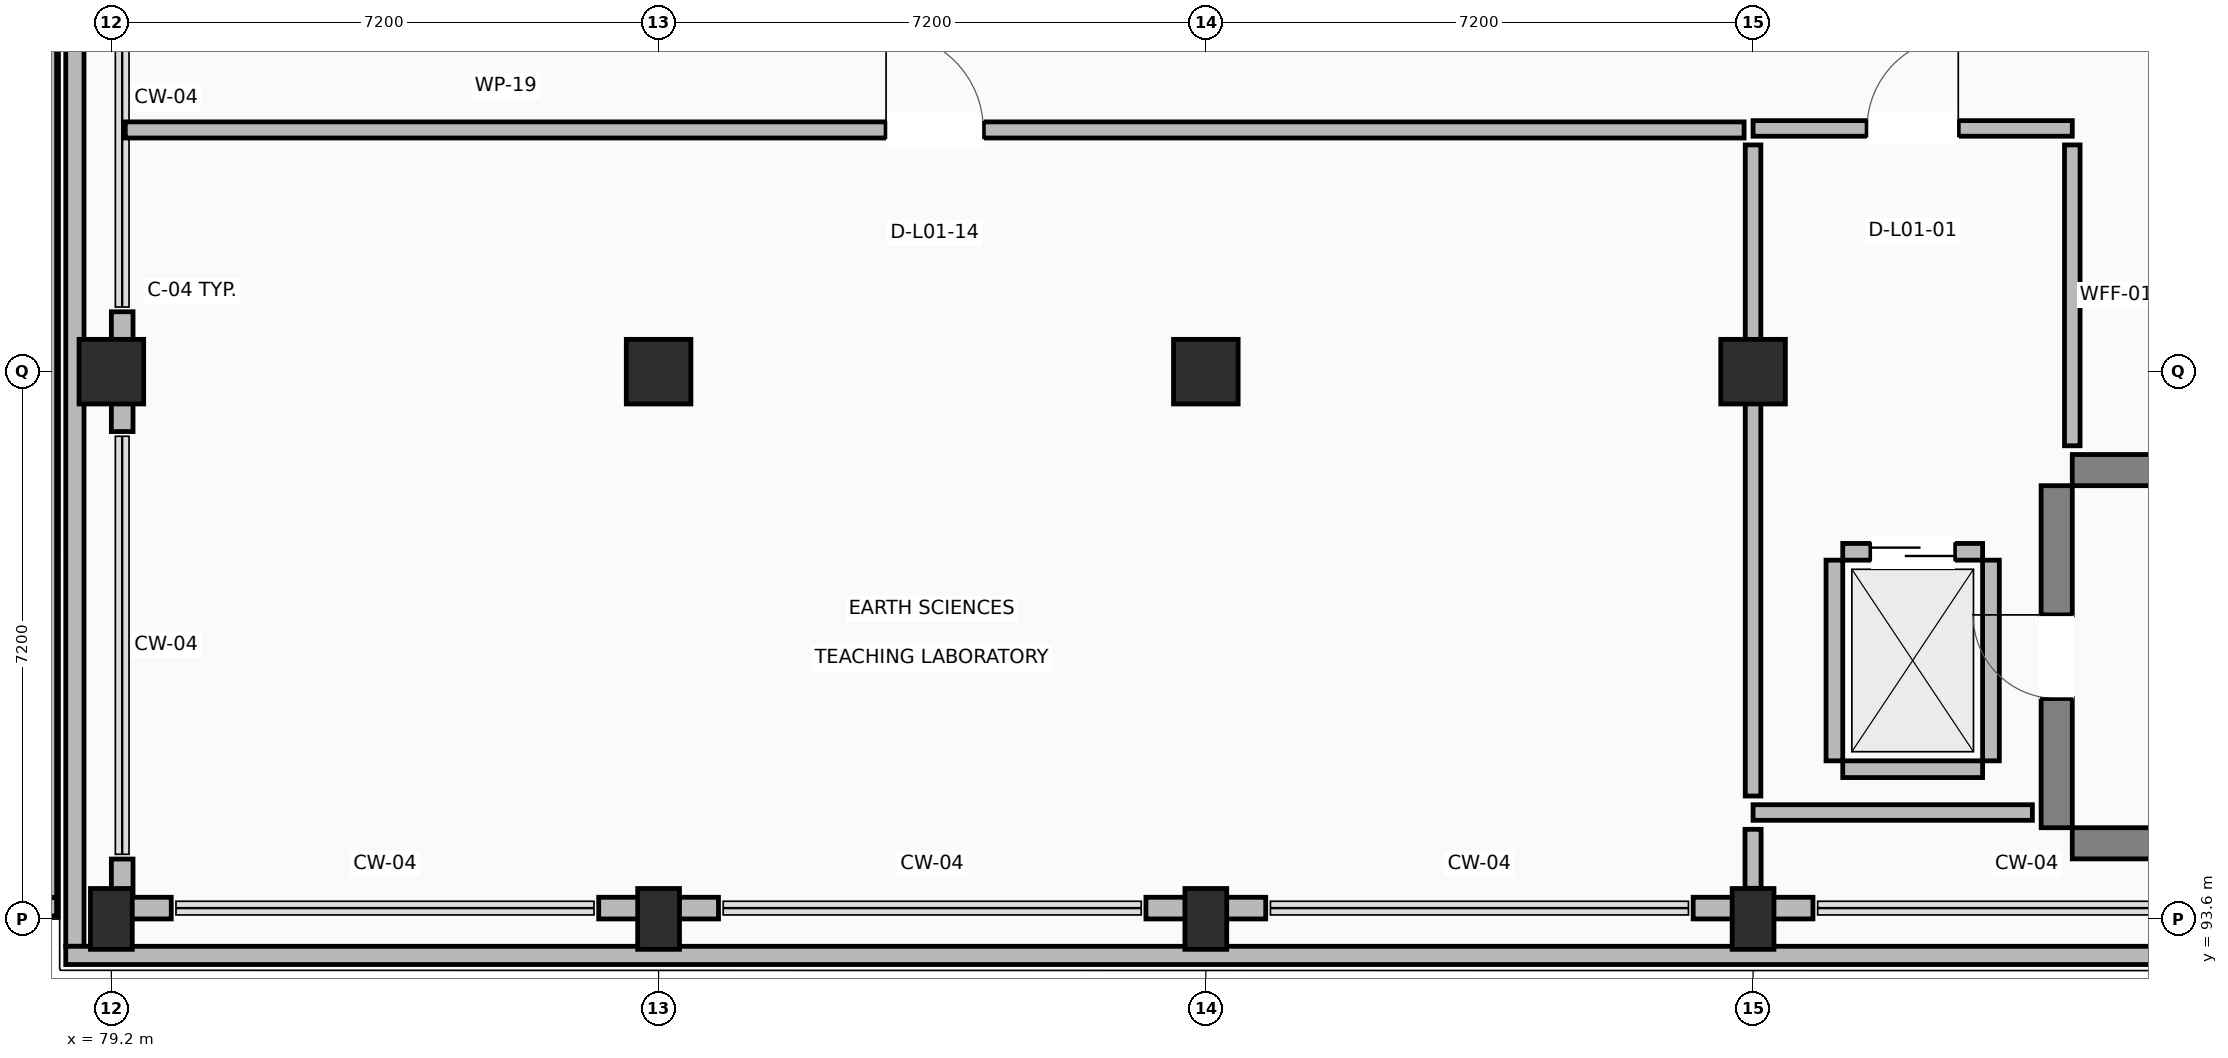
"""IFC4 building model, lengths in metres.
Left out: names, types, materials, properties, quantities, classifications, styles, units other than length and angle.
Written with IfcOpenShell. Run it as: python <this file> out.ifc"""

import sys

from ifc_helpers import new_model, si_unit, direction, frame, frame_2d, origin, origin_2d, place, context, subcontext, project, spatial, rectangle, extrude, element, fill, save


model = new_model("IFC4")
c1 = context("Model", 3, precision=1e-05, world=origin(), true_north=direction((0.0, 1.0)))
c2 = subcontext(c1, "Body", "Model", "MODEL_VIEW")
j1 = project(units=[si_unit("LENGTHUNIT", "METRE"), si_unit("PLANEANGLEUNIT", "RADIAN")], contexts=[c1])
p1 = place(None, origin())
s1 = spatial("IfcSite", under=j1, at=p1, CompositionType="ELEMENT")
p2 = place(p1, origin())
s2 = spatial("IfcBuilding", under=s1, at=p2, CompositionType="ELEMENT")
p3 = place(p2, frame((0.0, 0.0, 4.5)))
s3 = spatial("IfcBuildingStorey", under=s2, at=p3, CompositionType="ELEMENT", Elevation=4.5)
p4 = place(p3, frame((79.2, 93.6, 0.0), z_axis=(0.0, 0.0, 1.0), x_axis=(1.0, 0.0, 0.0)))
e1 = element("IfcColumn", 1, at=p4, inside=s3, PredefinedType="COLUMN", context=c2, shape_type="SweptSolid", body=[
    extrude(rectangle(XDim=0.55, YDim=0.8, at=origin_2d()), origin(), (0.0, 0.0, 1.0), 4.22),
])
p5 = place(p3, frame((79.2, 100.8, 0.0), z_axis=(0.0, 0.0, 1.0), x_axis=(1.0, 0.0, 0.0)))
e2 = element("IfcColumn", 2, at=p5, inside=s3, PredefinedType="COLUMN", context=c2, shape_type="SweptSolid", body=[
    extrude(rectangle(XDim=0.85, YDim=0.85, at=origin_2d()), origin(), (0.0, 0.0, 1.0), 4.22),
])
p6 = place(p3, frame((86.4, 93.6, 0.0), z_axis=(0.0, 0.0, 1.0), x_axis=(1.0, 0.0, 0.0)))
e3 = element("IfcColumn", 3, at=p6, inside=s3, PredefinedType="COLUMN", context=c2, shape_type="SweptSolid", body=[
    extrude(rectangle(XDim=0.55, YDim=0.8, at=origin_2d()), origin(), (0.0, 0.0, 1.0), 4.22),
])
p7 = place(p3, frame((86.4, 100.8, 0.0), z_axis=(0.0, 0.0, 1.0), x_axis=(1.0, 0.0, 0.0)))
e4 = element("IfcColumn", 4, at=p7, inside=s3, PredefinedType="COLUMN", context=c2, shape_type="SweptSolid", body=[
    extrude(rectangle(XDim=0.85, YDim=0.85, at=origin_2d()), origin(), (0.0, 0.0, 1.0), 4.22),
])
p8 = place(p3, frame((93.6, 93.6, 0.0), z_axis=(0.0, 0.0, 1.0), x_axis=(1.0, 0.0, 0.0)))
e5 = element("IfcColumn", 5, at=p8, inside=s3, PredefinedType="COLUMN", context=c2, shape_type="SweptSolid", body=[
    extrude(rectangle(XDim=0.55, YDim=0.8, at=origin_2d()), origin(), (0.0, 0.0, 1.0), 4.22),
])
p9 = place(p3, frame((93.6, 100.8, 0.0), z_axis=(0.0, 0.0, 1.0), x_axis=(1.0, 0.0, 0.0)))
e6 = element("IfcColumn", 6, at=p9, inside=s3, PredefinedType="COLUMN", context=c2, shape_type="SweptSolid", body=[
    extrude(rectangle(XDim=0.85, YDim=0.85, at=origin_2d()), origin(), (0.0, 0.0, 1.0), 4.22),
])
p10 = place(p3, frame((100.8, 93.6, 0.0), z_axis=(0.0, 0.0, 1.0), x_axis=(1.0, 0.0, 0.0)))
e7 = element("IfcColumn", 7, at=p10, inside=s3, PredefinedType="COLUMN", context=c2, shape_type="SweptSolid", body=[
    extrude(rectangle(XDim=0.55, YDim=0.8, at=origin_2d()), origin(), (0.0, 0.0, 1.0), 4.22),
])
p11 = place(p3, frame((100.8, 100.8, 0.0), z_axis=(0.0, 0.0, 1.0), x_axis=(1.0, 0.0, 0.0)))
e8 = element("IfcColumn", 8, at=p11, inside=s3, PredefinedType="COLUMN", context=c2, shape_type="SweptSolid", body=[
    extrude(rectangle(XDim=0.85, YDim=0.85, at=origin_2d()), origin(), (0.0, 0.0, 1.0), 4.22),
])
for number, where, z_axis, x_axis in (
    (9, (105.0, 94.595, 0.0), (0.0, 0.0, 1.0), (1.0, 0.0, 0.0)),
    (10, (105.0, 99.505, 0.0), (0.0, 0.0, 1.0), (1.0, 0.0, 0.0)),
):
    element("IfcWall", number, at=place(p3, frame(where, z_axis=z_axis, x_axis=x_axis)), inside=s3, PredefinedType="SHEAR", context=c2, shape_type="SweptSolid", body=[
        extrude(rectangle(XDim=9.5, YDim=0.41, at=frame_2d((4.75, 0.0))), origin(), (0.0, 0.0, 1.0), 4.22),
    ])
p12 = place(p3, frame((104.795, 94.8, 0.0), z_axis=(0.0, 0.0, 1.0), x_axis=(0.0, 1.0, 0.0)))
e11 = element("IfcWall", 11, at=p12, inside=s3, PredefinedType="SHEAR", context=c2, shape_type="SweptSolid", body=[
    extrude(rectangle(XDim=4.5, YDim=0.41, at=frame_2d((2.25, 0.0))), origin(), (0.0, 0.0, 1.0), 4.22),
])
p13 = place(p12, frame((1.7, 0.0, 0.0)))
e12 = element("IfcOpeningElement", 12, at=p13, cuts=e11, PredefinedType="OPENING", context=c2, shape_type="SweptSolid", body=[
    extrude(rectangle(XDim=1.1, YDim=2.15, at=frame_2d((0.55, 1.075))), frame((0.0, 0.215, 0.0), z_axis=(0.0, -1.0, 0.0), x_axis=(1.0, 0.0, 0.0)), (0.0, 0.0, 1.0), 0.43),
])
p14 = place(p3, frame((79.343, 101.588, 0.0), z_axis=(0.0, 0.0, 1.0), x_axis=(0.0, -1.0, 0.0)))
e13 = element("IfcWall", 13, at=p14, inside=s3, PredefinedType="STANDARD", context=c2, shape_type="SweptSolid", body=[
    extrude(rectangle(XDim=1.576, YDim=0.285, at=frame_2d((0.788, 0.0))), origin(), (0.0, 0.0, 1.0), 3.26),
])
p15 = place(p3, frame((79.343, 94.388, 0.0), z_axis=(0.0, 0.0, 1.0), x_axis=(0.0, -1.0, 0.0)))
e14 = element("IfcWall", 14, at=p15, inside=s3, PredefinedType="STANDARD", context=c2, shape_type="SweptSolid", body=[
    extrude(rectangle(XDim=0.503, YDim=0.285, at=frame_2d((0.251, 0.0))), origin(), (0.0, 0.0, 1.0), 3.26),
])
p16 = place(p3, frame((79.2, 93.742, 0.0), z_axis=(0.0, 0.0, 1.0), x_axis=(1.0, 0.0, 0.0)))
e15 = element("IfcWall", 15, at=p16, inside=s3, PredefinedType="STANDARD", context=c2, shape_type="SweptSolid", body=[
    extrude(rectangle(XDim=0.788, YDim=0.285, at=frame_2d((0.394, 0.0))), origin(), (0.0, 0.0, 1.0), 3.26),
])
for number, where, z_axis, x_axis in (
    (16, (85.612, 93.742, 0.0), (0.0, 0.0, 1.0), (1.0, 0.0, 0.0)),
    (17, (92.812, 93.742, 0.0), (0.0, 0.0, 1.0), (1.0, 0.0, 0.0)),
    (18, (100.012, 93.742, 0.0), (0.0, 0.0, 1.0), (1.0, 0.0, 0.0)),
):
    element("IfcWall", number, at=place(p3, frame(where, z_axis=z_axis, x_axis=x_axis)), inside=s3, PredefinedType="STANDARD", context=c2, shape_type="SweptSolid", body=[
        extrude(rectangle(XDim=1.576, YDim=0.285, at=frame_2d((0.788, 0.0))), origin(), (0.0, 0.0, 1.0), 3.26),
    ])
p17 = place(p3, frame((78.72, 93.24, 0.0), z_axis=(0.0, 0.0, 1.0), x_axis=(0.0, 1.0, 0.0)))
e19 = element("IfcWall", 19, at=p17, inside=s3, PredefinedType="PARAPET", context=c2, shape_type="SweptSolid", body=[
    extrude(rectangle(XDim=22.32, YDim=0.24, at=frame_2d((11.16, 0.0))), origin(), (0.0, 0.0, 1.0), 1.12),
])
p18 = place(p3, frame((136.44, 93.12, 0.0), z_axis=(0.0, 0.0, 1.0), x_axis=(-1.0, 0.0, 0.0)))
e20 = element("IfcWall", 20, at=p18, inside=s3, PredefinedType="PARAPET", context=c2, shape_type="SweptSolid", body=[
    extrude(rectangle(XDim=57.84, YDim=0.24, at=frame_2d((28.92, 0.0))), origin(), (0.0, 0.0, 1.0), 1.12),
])
p19 = place(p3, frame((78.36, 107.72, 0.0), z_axis=(0.0, 0.0, 1.0), x_axis=(0.0, -1.0, 0.0)))
e21 = element("IfcWall", 21, at=p19, inside=s3, PredefinedType="PARAPET", context=c2, shape_type="SweptSolid", body=[
    extrude(rectangle(XDim=13.84, YDim=0.24, at=frame_2d((6.92, 0.0))), origin(), (0.0, 0.0, 1.0), 1.12),
])
p20 = place(p3, frame((78.48, 93.76, 0.0), z_axis=(0.0, 0.0, 1.0), x_axis=(-1.0, 0.0, 0.0)))
e22 = element("IfcWall", 22, at=p20, inside=s3, PredefinedType="PARAPET", context=c2, shape_type="SweptSolid", body=[
    extrude(rectangle(XDim=28.04, YDim=0.24, at=frame_2d((14.02, 0.0))), origin(), (0.0, 0.0, 1.0), 1.12),
])
p21 = place(p3, frame((101.98, 95.57, 0.0), z_axis=(0.0, 0.0, 1.0), x_axis=(1.0, 0.0, 0.0)))
e23 = element("IfcWall", 23, at=p21, inside=s3, PredefinedType="STANDARD", context=c2, shape_type="SweptSolid", body=[
    extrude(rectangle(XDim=1.84, YDim=0.22, at=frame_2d((0.92, 0.0))), origin(), (0.0, 0.0, 1.0), 3.26),
])
p22 = place(p3, frame((101.98, 98.43, 0.0), z_axis=(0.0, 0.0, 1.0), x_axis=(1.0, 0.0, 0.0)))
e24 = element("IfcWall", 24, at=p22, inside=s3, PredefinedType="STANDARD", context=c2, shape_type="SweptSolid", body=[
    extrude(rectangle(XDim=1.84, YDim=0.22, at=frame_2d((0.92, 0.0))), origin(), (0.0, 0.0, 1.0), 3.26),
])
p23 = place(p22, frame((0.37, 0.0, 0.0)))
e25 = element("IfcOpeningElement", 25, at=p23, cuts=e24, PredefinedType="OPENING", context=c2, shape_type="SweptSolid", body=[
    extrude(rectangle(XDim=1.1, YDim=2.15, at=frame_2d((0.55, 1.075))), frame((0.0, 0.12, 0.0), z_axis=(0.0, -1.0, 0.0), x_axis=(1.0, 0.0, 0.0)), (0.0, 0.0, 1.0), 0.24),
])
for number, where, z_axis, x_axis in (
    (26, (101.87, 95.68, 0.0), (0.0, 0.0, 1.0), (0.0, 1.0, 0.0)),
    (27, (103.93, 95.68, 0.0), (0.0, 0.0, 1.0), (0.0, 1.0, 0.0)),
):
    element("IfcWall", number, at=place(p3, frame(where, z_axis=z_axis, x_axis=x_axis)), inside=s3, PredefinedType="STANDARD", context=c2, shape_type="SweptSolid", body=[
        extrude(rectangle(XDim=2.64, YDim=0.22, at=frame_2d((1.32, 0.0))), origin(), (0.0, 0.0, 1.0), 3.26),
    ])
p24 = place(p3, frame((100.8, 104.0, 0.0), z_axis=(0.0, 0.0, 1.0), x_axis=(1.0, 0.0, 0.0)))
e28 = element("IfcWall", 28, at=p24, inside=s3, PredefinedType="PARTITIONING", context=c2, shape_type="SweptSolid", body=[
    extrude(rectangle(XDim=4.2, YDim=0.205, at=frame_2d((2.1, 0.0))), origin(), (0.0, 0.0, 1.0), 3.26),
])
p25 = place(p24, frame((1.5, 0.0, 0.0)))
e29 = element("IfcOpeningElement", 29, at=p25, cuts=e28, PredefinedType="OPENING", context=c2, shape_type="SweptSolid", body=[
    extrude(rectangle(XDim=1.2, YDim=2.15, at=frame_2d((0.6, 1.075))), frame((0.0, 0.113, 0.0), z_axis=(0.0, -1.0, 0.0), x_axis=(1.0, 0.0, 0.0)), (0.0, 0.0, 1.0), 0.225),
])
p26 = place(p3, frame((105.0, 103.783, 0.0), z_axis=(0.0, 0.0, 1.0), x_axis=(0.0, -1.0, 0.0)))
e30 = element("IfcWall", 30, at=p26, inside=s3, PredefinedType="PARTITIONING", context=c2, shape_type="SweptSolid", body=[
    extrude(rectangle(XDim=3.958, YDim=0.205, at=frame_2d((1.979, 0.0))), origin(), (0.0, 0.0, 1.0), 3.26),
])
p27 = place(p3, frame((104.475, 95.0, 0.0), z_axis=(0.0, 0.0, 1.0), x_axis=(-1.0, 0.0, 0.0)))
e31 = element("IfcWall", 31, at=p27, inside=s3, PredefinedType="PARTITIONING", context=c2, shape_type="SweptSolid", body=[
    extrude(rectangle(XDim=3.675, YDim=0.205, at=frame_2d((1.837, 0.0))), origin(), (0.0, 0.0, 1.0), 3.26),
])
p28 = place(p3, frame((100.8, 95.217, 0.0), z_axis=(0.0, 0.0, 1.0), x_axis=(0.0, 1.0, 0.0)))
e32 = element("IfcWall", 32, at=p28, inside=s3, PredefinedType="PARTITIONING", context=c2, shape_type="SweptSolid", body=[
    extrude(rectangle(XDim=8.566, YDim=0.205, at=frame_2d((4.283, 0.0))), origin(), (0.0, 0.0, 1.0), 3.26),
])
p29 = place(p3, frame((79.383, 103.98, 0.0), z_axis=(0.0, 0.0, 1.0), x_axis=(1.0, 0.0, 0.0)))
e33 = element("IfcWall", 33, at=p29, inside=s3, PredefinedType="PARTITIONING", context=c2, shape_type="SweptSolid", body=[
    extrude(rectangle(XDim=21.299, YDim=0.212, at=frame_2d((10.649, 0.0))), origin(), (0.0, 0.0, 1.0), 3.26),
])
p30 = place(p29, frame((10.01, 0.0, 0.0)))
e34 = element("IfcOpeningElement", 34, at=p30, cuts=e33, PredefinedType="OPENING", context=c2, shape_type="SweptSolid", body=[
    extrude(rectangle(XDim=1.28, YDim=2.15, at=frame_2d((0.64, 1.075))), frame((0.0, 0.116, 0.0), z_axis=(0.0, -1.0, 0.0), x_axis=(1.0, 0.0, 0.0)), (0.0, 0.0, 1.0), 0.232),
])
p31 = place(p3, frame((100.8, 94.779, 0.0), z_axis=(0.0, 0.0, 1.0), x_axis=(0.0, -1.0, 0.0)))
e35 = element("IfcWall", 35, at=p31, inside=s3, PredefinedType="PARTITIONING", context=c2, shape_type="SweptSolid", body=[
    extrude(rectangle(XDim=0.776, YDim=0.212, at=frame_2d((0.388, 0.0))), origin(), (0.0, 0.0, 1.0), 3.26),
])
p32 = place(p13, origin())
e36 = element("IfcDoor", 36, at=p32, inside=s3, OperationType="SINGLE_SWING_RIGHT", PredefinedType="DOOR", context=c2, shape_type="SweptSolid", body=[
    extrude(rectangle(XDim=1.1, YDim=2.15, at=frame_2d((0.55, 1.075))), frame((0.0, 0.025, 0.0), z_axis=(0.0, -1.0, 0.0), x_axis=(1.0, 0.0, 0.0)), (0.0, 0.0, 1.0), 0.05),
])
fill(e12, e36)
p33 = place(p23, origin())
e37 = element("IfcDoor", 37, at=p33, inside=s3, OperationType="SLIDING_TO_RIGHT", PredefinedType="DOOR", context=c2, shape_type="SweptSolid", body=[
    extrude(rectangle(XDim=1.1, YDim=2.15, at=frame_2d((0.55, 1.075))), frame((0.0, 0.025, 0.0), z_axis=(0.0, -1.0, 0.0), x_axis=(1.0, 0.0, 0.0)), (0.0, 0.0, 1.0), 0.05),
])
fill(e25, e37)
p34 = place(p25, origin())
e38 = element("IfcDoor", 38, at=p34, inside=s3, OperationType="SINGLE_SWING_RIGHT", PredefinedType="DOOR", context=c2, shape_type="SweptSolid", body=[
    extrude(rectangle(XDim=1.2, YDim=2.15, at=frame_2d((0.6, 1.075))), frame((0.0, 0.025, 0.0), z_axis=(0.0, -1.0, 0.0), x_axis=(1.0, 0.0, 0.0)), (0.0, 0.0, 1.0), 0.05),
])
fill(e29, e38)
p35 = place(p30, origin())
e39 = element("IfcDoor", 39, at=p35, inside=s3, OperationType="SINGLE_SWING_LEFT", PredefinedType="DOOR", context=c2, shape_type="SweptSolid", body=[
    extrude(rectangle(XDim=1.28, YDim=2.15, at=frame_2d((0.64, 1.075))), frame((0.0, 0.025, 0.0), z_axis=(0.0, -1.0, 0.0), x_axis=(1.0, 0.0, 0.0)), (0.0, 0.0, 1.0), 0.05),
])
fill(e34, e39)
save(model, sys.argv[1])
